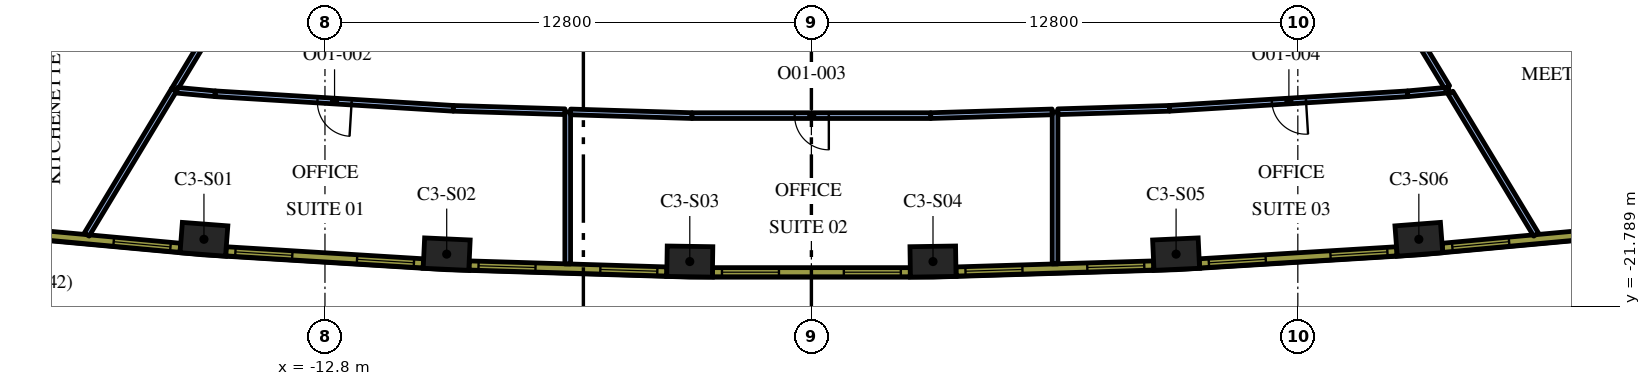
"""IFC4 building model, lengths in metres.
Left out: names, types, materials, properties, quantities, classifications, styles, units other than length and angle.
Written with IfcOpenShell. Run it as: python <this file> out.ifc"""

import sys

from ifc_helpers import new_model, si_unit, direction, frame, frame_2d, origin, origin_2d, place, context, subcontext, project, spatial, rectangle, extrude, element, fill, save


model = new_model("IFC4")
c1 = context("Model", 3, precision=1e-05, world=origin(), true_north=direction((0.0, 1.0)))
c2 = subcontext(c1, "Body", "Model", "MODEL_VIEW")
j1 = project(units=[si_unit("LENGTHUNIT", "METRE"), si_unit("PLANEANGLEUNIT", "RADIAN")], contexts=[c1])
p1 = place(None, origin())
s1 = spatial("IfcSite", under=j1, at=p1, CompositionType="ELEMENT")
p2 = place(p1, origin())
s2 = spatial("IfcBuilding", under=s1, at=p2, CompositionType="ELEMENT")
p3 = place(p2, frame((0.0, 0.0, 150.0)))
s3 = spatial("IfcBuildingStorey", under=s2, at=p3, CompositionType="ELEMENT", Elevation=150.0)
for number, where, z_axis, x_axis in (
    (1, (-15.985, -20.022, 0.0), (0.0, 0.0, 1.0), (0.997, -0.076, 0.0)),
    (2, (-9.597, -20.413, 0.0), (0.0, 0.0, 1.0), (0.999, -0.046, 0.0)),
    (3, (-3.2, -20.608, 0.0), (0.0, 0.0, 1.0), (1.0, -0.015, 0.0)),
    (4, (3.2, -20.608, 0.0), (0.0, 0.0, 1.0), (1.0, 0.015, 0.0)),
    (5, (9.597, -20.413, 0.0), (0.0, 0.0, 1.0), (0.999, 0.046, 0.0)),
    (6, (15.985, -20.022, 0.0), (0.0, 0.0, 1.0), (0.997, 0.076, 0.0)),
):
    element("IfcColumn", number, at=place(p3, frame(where, z_axis=z_axis, x_axis=x_axis)), inside=s3, PredefinedType="COLUMN", context=c2, shape_type="SweptSolid", body=[
        extrude(rectangle(XDim=1.2, YDim=0.8, at=origin_2d()), origin(), (0.0, 0.0, 1.0), 4.2),
    ])
p4 = place(p3, frame((-16.771, -16.09, 0.0), z_axis=(0.0, 0.0, 1.0), x_axis=(-0.516817512045, -0.856095590015, 0.0)))
e7 = element("IfcWall", 7, at=p4, inside=s3, PredefinedType="PARTITIONING", context=c2, shape_type="SweptSolid", body=[
    extrude(rectangle(XDim=4.45, YDim=0.15, at=frame_2d((2.225, 0.0))), origin(), (0.0, 0.0, 1.0), 3.15),
])
p5 = place(p3, frame((-16.775, -16.097, 0.0), z_axis=(0.0, 0.0, 1.0), x_axis=(0.516793803756, 0.856109902057, 0.0)))
e8 = element("IfcWall", 8, at=p5, inside=s3, PredefinedType="PARTITIONING", context=c2, shape_type="SweptSolid", body=[
    extrude(rectangle(XDim=3.856, YDim=0.15, at=frame_2d((1.928, 0.0))), origin(), (0.0, 0.0, 1.0), 3.15),
])
p6 = place(p5, frame((1.456, 0.0, 0.0)))
e9 = element("IfcOpeningElement", 9, at=p6, cuts=e8, PredefinedType="OPENING", context=c2, shape_type="SweptSolid", body=[
    extrude(rectangle(XDim=0.9, YDim=2.1, at=frame_2d((0.45, 1.05))), frame((0.0, 0.085, 0.0), z_axis=(0.0, -1.0, 0.0), x_axis=(1.0, 0.0, 0.0)), (0.0, 0.0, 1.0), 0.17),
])
p7 = place(p3, frame((-6.412, -16.668, 0.0), z_axis=(0.0, 0.0, 1.0), x_axis=(0.0, -1.0, 0.0)))
e10 = element("IfcWall", 10, at=p7, inside=s3, PredefinedType="PARTITIONING", context=c2, shape_type="SweptSolid", body=[
    extrude(rectangle(XDim=4.002, YDim=0.15, at=frame_2d((2.001, 0.0))), origin(), (0.0, 0.0, 1.0), 3.15),
])
p8 = place(p3, frame((-16.69, -16.102, 0.0), z_axis=(0.0, 0.0, 1.0), x_axis=(0.995818997537, -0.091348366946, 0.0)))
e11 = element("IfcWall", 11, at=p8, inside=s3, PredefinedType="PARTITIONING", context=c2, shape_type="SweptSolid", body=[
    extrude(rectangle(XDim=1.002, YDim=0.15, at=frame_2d((0.501, 0.0))), origin(), (0.0, 0.0, 1.0), 3.15),
])
p9 = place(p3, frame((-9.421, -16.576, 0.0), z_axis=(0.0, 0.0, 1.0), x_axis=(-0.998137075468, 0.061011298754, 0.0)))
e12 = element("IfcWall", 12, at=p9, inside=s3, PredefinedType="PARTITIONING", context=c2, shape_type="SweptSolid", body=[
    extrude(rectangle(XDim=6.282, YDim=0.15, at=frame_2d((3.141, 0.0))), origin(), (0.0, 0.0, 1.0), 3.15),
])
p10 = place(p9, frame((2.683, 0.0, 0.0)))
e13 = element("IfcOpeningElement", 13, at=p10, cuts=e12, PredefinedType="OPENING", context=c2, shape_type="SweptSolid", body=[
    extrude(rectangle(XDim=0.9, YDim=2.1, at=frame_2d((0.45, 1.05))), frame((0.0, 0.085, 0.0), z_axis=(0.0, -1.0, 0.0), x_axis=(1.0, 0.0, 0.0)), (0.0, 0.0, 1.0), 0.17),
])
p11 = place(p3, frame((-9.421, -16.576, 0.0), z_axis=(0.0, 0.0, 1.0), x_axis=(0.999533978083, -0.030525835896, 0.0)))
e14 = element("IfcWall", 14, at=p11, inside=s3, PredefinedType="PARTITIONING", context=c2, shape_type="SweptSolid", body=[
    extrude(rectangle(XDim=2.935, YDim=0.15, at=frame_2d((1.468, 0.0))), origin(), (0.0, 0.0, 1.0), 3.15),
])
p12 = place(p3, frame((6.412, -16.668, 0.0), z_axis=(0.0, 0.0, 1.0), x_axis=(0.0, -1.0, 0.0)))
e15 = element("IfcWall", 15, at=p12, inside=s3, PredefinedType="PARTITIONING", context=c2, shape_type="SweptSolid", body=[
    extrude(rectangle(XDim=4.002, YDim=0.15, at=frame_2d((2.001, 0.0))), origin(), (0.0, 0.0, 1.0), 3.15),
])
p13 = place(p3, frame((-6.337, -16.671, 0.0), z_axis=(0.0, 0.0, 1.0), x_axis=(0.999533369646, -0.030545751995, 0.0)))
e16 = element("IfcWall", 16, at=p13, inside=s3, PredefinedType="PARTITIONING", context=c2, shape_type="SweptSolid", body=[
    extrude(rectangle(XDim=3.197, YDim=0.15, at=frame_2d((1.599, 0.0))), origin(), (0.0, 0.0, 1.0), 3.15),
])
p14 = place(p3, frame((3.141, -16.768, 0.0), z_axis=(0.0, 0.0, 1.0), x_axis=(-1.0, 0.0, 0.0)))
e17 = element("IfcWall", 17, at=p14, inside=s3, PredefinedType="PARTITIONING", context=c2, shape_type="SweptSolid", body=[
    extrude(rectangle(XDim=6.283, YDim=0.15, at=frame_2d((3.141, 0.0))), origin(), (0.0, 0.0, 1.0), 3.15),
])
p15 = place(p14, frame((2.683, 0.0, 0.0)))
e18 = element("IfcOpeningElement", 18, at=p15, cuts=e17, PredefinedType="OPENING", context=c2, shape_type="SweptSolid", body=[
    extrude(rectangle(XDim=0.9, YDim=2.1, at=frame_2d((0.45, 1.05))), frame((0.0, 0.085, 0.0), z_axis=(0.0, -1.0, 0.0), x_axis=(1.0, 0.0, 0.0)), (0.0, 0.0, 1.0), 0.17),
])
p16 = place(p3, frame((3.141, -16.768, 0.0), z_axis=(0.0, 0.0, 1.0), x_axis=(0.999533369646, 0.030545751995, 0.0)))
e19 = element("IfcWall", 19, at=p16, inside=s3, PredefinedType="PARTITIONING", context=c2, shape_type="SweptSolid", body=[
    extrude(rectangle(XDim=3.197, YDim=0.15, at=frame_2d((1.599, 0.0))), origin(), (0.0, 0.0, 1.0), 3.15),
])
p17 = place(p3, frame((6.487, -16.666, 0.0), z_axis=(0.0, 0.0, 1.0), x_axis=(0.999533978083, 0.030525835896, 0.0)))
e20 = element("IfcWall", 20, at=p17, inside=s3, PredefinedType="PARTITIONING", context=c2, shape_type="SweptSolid", body=[
    extrude(rectangle(XDim=2.935, YDim=0.15, at=frame_2d((1.468, 0.0))), origin(), (0.0, 0.0, 1.0), 3.15),
])
p18 = place(p3, frame((15.692, -16.193, 0.0), z_axis=(0.0, 0.0, 1.0), x_axis=(-0.998137075468, -0.061011298754, 0.0)))
e21 = element("IfcWall", 21, at=p18, inside=s3, PredefinedType="PARTITIONING", context=c2, shape_type="SweptSolid", body=[
    extrude(rectangle(XDim=6.282, YDim=0.15, at=frame_2d((3.141, 0.0))), origin(), (0.0, 0.0, 1.0), 3.15),
])
p19 = place(p18, frame((2.683, 0.0, 0.0)))
e22 = element("IfcOpeningElement", 22, at=p19, cuts=e21, PredefinedType="OPENING", context=c2, shape_type="SweptSolid", body=[
    extrude(rectangle(XDim=0.9, YDim=2.1, at=frame_2d((0.45, 1.05))), frame((0.0, 0.085, 0.0), z_axis=(0.0, -1.0, 0.0), x_axis=(1.0, 0.0, 0.0)), (0.0, 0.0, 1.0), 0.17),
])
p20 = place(p3, frame((15.692, -16.193, 0.0), z_axis=(0.0, 0.0, 1.0), x_axis=(0.995822859979, 0.091306251389, 0.0)))
e23 = element("IfcWall", 23, at=p20, inside=s3, PredefinedType="PARTITIONING", context=c2, shape_type="SweptSolid", body=[
    extrude(rectangle(XDim=1.086, YDim=0.15, at=frame_2d((0.543, 0.0))), origin(), (0.0, 0.0, 1.0), 3.15),
])
p21 = place(p3, frame((16.816, -16.165, 0.0), z_axis=(0.0, 0.0, 1.0), x_axis=(0.516814925326, -0.85609715159, 0.0)))
e24 = element("IfcWall", 24, at=p21, inside=s3, PredefinedType="PARTITIONING", context=c2, shape_type="SweptSolid", body=[
    extrude(rectangle(XDim=4.362, YDim=0.15, at=frame_2d((2.181, 0.0))), origin(), (0.0, 0.0, 1.0), 3.15),
])
p22 = place(p3, frame((14.782, -12.796, 0.0), z_axis=(0.0, 0.0, 1.0), x_axis=(0.516809076879, -0.856100682196, 0.0)))
e25 = element("IfcWall", 25, at=p22, inside=s3, PredefinedType="PARTITIONING", context=c2, shape_type="SweptSolid", body=[
    extrude(rectangle(XDim=3.768, YDim=0.15, at=frame_2d((1.884, 0.0))), origin(), (0.0, 0.0, 1.0), 3.15),
])
p23 = place(p22, frame((1.4, 0.0, 0.0)))
e26 = element("IfcOpeningElement", 26, at=p23, cuts=e25, PredefinedType="OPENING", context=c2, shape_type="SweptSolid", body=[
    extrude(rectangle(XDim=0.9, YDim=2.1, at=frame_2d((0.45, 1.05))), frame((0.0, 0.085, 0.0), z_axis=(0.0, -1.0, 0.0), x_axis=(1.0, 0.0, 0.0)), (0.0, 0.0, 1.0), 0.17),
])
p24 = place(p3, frame((-21.797, -19.77, 0.0), z_axis=(0.0, 0.0, 1.0), x_axis=(0.995808712151, -0.091460422067, 0.0)))
e27 = element("IfcWall", 27, at=p24, inside=s3, PredefinedType="SOLIDWALL", context=c2, shape_type="SweptSolid", body=[
    extrude(rectangle(XDim=5.213, YDim=0.24, at=frame_2d((2.606, 0.0))), origin(), (0.0, 0.0, 1.0), 3.95),
])
p25 = place(p24, frame((0.221, 0.0, 0.9)))
e28 = element("IfcOpeningElement", 28, at=p25, cuts=e27, PredefinedType="OPENING", context=c2, shape_type="SweptSolid", body=[
    extrude(rectangle(XDim=1.5, YDim=2.55, at=frame_2d((0.75, 1.275))), frame((0.0, 0.13, 0.0), z_axis=(0.0, -1.0, 0.0), x_axis=(1.0, 0.0, 0.0)), (0.0, 0.0, 1.0), 0.26),
])
p26 = place(p24, frame((3.452, 0.0, 0.9)))
e29 = element("IfcOpeningElement", 29, at=p26, cuts=e27, PredefinedType="OPENING", context=c2, shape_type="SweptSolid", body=[
    extrude(rectangle(XDim=1.5, YDim=2.55, at=frame_2d((0.75, 1.275))), frame((0.0, 0.13, 0.0), z_axis=(0.0, -1.0, 0.0), x_axis=(1.0, 0.0, 0.0)), (0.0, 0.0, 1.0), 0.26),
])
p27 = place(p3, frame((-15.405, -20.338, 0.0), z_axis=(0.0, 0.0, 1.0), x_axis=(0.998135294646, -0.061040425794, 0.0)))
e30 = element("IfcWall", 30, at=p27, inside=s3, PredefinedType="SOLIDWALL", context=c2, shape_type="SweptSolid", body=[
    extrude(rectangle(XDim=5.204, YDim=0.24, at=frame_2d((2.602, 0.0))), origin(), (0.0, 0.0, 1.0), 3.95),
])
p28 = place(p27, frame((0.248, 0.0, 0.9)))
e31 = element("IfcOpeningElement", 31, at=p28, cuts=e30, PredefinedType="OPENING", context=c2, shape_type="SweptSolid", body=[
    extrude(rectangle(XDim=1.5, YDim=2.55, at=frame_2d((0.75, 1.275))), frame((0.0, 0.13, 0.0), z_axis=(0.0, -1.0, 0.0), x_axis=(1.0, 0.0, 0.0)), (0.0, 0.0, 1.0), 0.26),
])
p29 = place(p27, frame((3.455, 0.0, 0.9)))
e32 = element("IfcOpeningElement", 32, at=p29, cuts=e30, PredefinedType="OPENING", context=c2, shape_type="SweptSolid", body=[
    extrude(rectangle(XDim=1.5, YDim=2.55, at=frame_2d((0.75, 1.275))), frame((0.0, 0.13, 0.0), z_axis=(0.0, -1.0, 0.0), x_axis=(1.0, 0.0, 0.0)), (0.0, 0.0, 1.0), 0.26),
])
p30 = place(p3, frame((-9.007, -20.711, 0.0), z_axis=(0.0, 0.0, 1.0), x_axis=(0.999533441983, -0.030543384845, 0.0)))
e33 = element("IfcWall", 33, at=p30, inside=s3, PredefinedType="SOLIDWALL", context=c2, shape_type="SweptSolid", body=[
    extrude(rectangle(XDim=5.204, YDim=0.24, at=frame_2d((2.602, 0.0))), origin(), (0.0, 0.0, 1.0), 3.95),
])
p31 = place(p30, frame((0.248, 0.0, 0.9)))
e34 = element("IfcOpeningElement", 34, at=p31, cuts=e33, PredefinedType="OPENING", context=c2, shape_type="SweptSolid", body=[
    extrude(rectangle(XDim=1.5, YDim=2.55, at=frame_2d((0.75, 1.275))), frame((0.0, 0.13, 0.0), z_axis=(0.0, -1.0, 0.0), x_axis=(1.0, 0.0, 0.0)), (0.0, 0.0, 1.0), 0.26),
])
p32 = place(p30, frame((3.455, 0.0, 0.9)))
e35 = element("IfcOpeningElement", 35, at=p32, cuts=e33, PredefinedType="OPENING", context=c2, shape_type="SweptSolid", body=[
    extrude(rectangle(XDim=1.5, YDim=2.55, at=frame_2d((0.75, 1.275))), frame((0.0, 0.13, 0.0), z_axis=(0.0, -1.0, 0.0), x_axis=(1.0, 0.0, 0.0)), (0.0, 0.0, 1.0), 0.26),
])
p33 = place(p3, frame((-2.602, -20.888, 0.0), z_axis=(0.0, 0.0, 1.0), x_axis=(1.0, 0.0, 0.0)))
e36 = element("IfcWall", 36, at=p33, inside=s3, PredefinedType="SOLIDWALL", context=c2, shape_type="SweptSolid", body=[
    extrude(rectangle(XDim=5.204, YDim=0.24, at=frame_2d((2.602, 0.0))), origin(), (0.0, 0.0, 1.0), 3.95),
])
p34 = place(p33, frame((0.248, 0.0, 0.9)))
e37 = element("IfcOpeningElement", 37, at=p34, cuts=e36, PredefinedType="OPENING", context=c2, shape_type="SweptSolid", body=[
    extrude(rectangle(XDim=1.5, YDim=2.55, at=frame_2d((0.75, 1.275))), frame((0.0, 0.13, 0.0), z_axis=(0.0, -1.0, 0.0), x_axis=(1.0, 0.0, 0.0)), (0.0, 0.0, 1.0), 0.26),
])
p35 = place(p33, frame((3.455, 0.0, 0.9)))
e38 = element("IfcOpeningElement", 38, at=p35, cuts=e36, PredefinedType="OPENING", context=c2, shape_type="SweptSolid", body=[
    extrude(rectangle(XDim=1.5, YDim=2.55, at=frame_2d((0.75, 1.275))), frame((0.0, 0.13, 0.0), z_axis=(0.0, -1.0, 0.0), x_axis=(1.0, 0.0, 0.0)), (0.0, 0.0, 1.0), 0.26),
])
p36 = place(p3, frame((3.806, -20.87, 0.0), z_axis=(0.0, 0.0, 1.0), x_axis=(0.999533441983, 0.030543384845, 0.0)))
e39 = element("IfcWall", 39, at=p36, inside=s3, PredefinedType="SOLIDWALL", context=c2, shape_type="SweptSolid", body=[
    extrude(rectangle(XDim=5.204, YDim=0.24, at=frame_2d((2.602, 0.0))), origin(), (0.0, 0.0, 1.0), 3.95),
])
p37 = place(p36, frame((0.248, 0.0, 0.9)))
e40 = element("IfcOpeningElement", 40, at=p37, cuts=e39, PredefinedType="OPENING", context=c2, shape_type="SweptSolid", body=[
    extrude(rectangle(XDim=1.5, YDim=2.55, at=frame_2d((0.75, 1.275))), frame((0.0, 0.13, 0.0), z_axis=(0.0, -1.0, 0.0), x_axis=(1.0, 0.0, 0.0)), (0.0, 0.0, 1.0), 0.26),
])
p38 = place(p36, frame((3.455, 0.0, 0.9)))
e41 = element("IfcOpeningElement", 41, at=p38, cuts=e39, PredefinedType="OPENING", context=c2, shape_type="SweptSolid", body=[
    extrude(rectangle(XDim=1.5, YDim=2.55, at=frame_2d((0.75, 1.275))), frame((0.0, 0.13, 0.0), z_axis=(0.0, -1.0, 0.0), x_axis=(1.0, 0.0, 0.0)), (0.0, 0.0, 1.0), 0.26),
])
p39 = place(p3, frame((10.211, -20.656, 0.0), z_axis=(0.0, 0.0, 1.0), x_axis=(0.998135294646, 0.061040425794, 0.0)))
e42 = element("IfcWall", 42, at=p39, inside=s3, PredefinedType="SOLIDWALL", context=c2, shape_type="SweptSolid", body=[
    extrude(rectangle(XDim=5.204, YDim=0.24, at=frame_2d((2.602, 0.0))), origin(), (0.0, 0.0, 1.0), 3.95),
])
p40 = place(p39, frame((0.248, 0.0, 0.9)))
e43 = element("IfcOpeningElement", 43, at=p40, cuts=e42, PredefinedType="OPENING", context=c2, shape_type="SweptSolid", body=[
    extrude(rectangle(XDim=1.5, YDim=2.55, at=frame_2d((0.75, 1.275))), frame((0.0, 0.13, 0.0), z_axis=(0.0, -1.0, 0.0), x_axis=(1.0, 0.0, 0.0)), (0.0, 0.0, 1.0), 0.26),
])
p41 = place(p39, frame((3.455, 0.0, 0.9)))
e44 = element("IfcOpeningElement", 44, at=p41, cuts=e42, PredefinedType="OPENING", context=c2, shape_type="SweptSolid", body=[
    extrude(rectangle(XDim=1.5, YDim=2.55, at=frame_2d((0.75, 1.275))), frame((0.0, 0.13, 0.0), z_axis=(0.0, -1.0, 0.0), x_axis=(1.0, 0.0, 0.0)), (0.0, 0.0, 1.0), 0.26),
])
p42 = place(p3, frame((16.606, -20.247, 0.0), z_axis=(0.0, 0.0, 1.0), x_axis=(0.995808712151, 0.091460422067, 0.0)))
e45 = element("IfcWall", 45, at=p42, inside=s3, PredefinedType="SOLIDWALL", context=c2, shape_type="SweptSolid", body=[
    extrude(rectangle(XDim=5.213, YDim=0.24, at=frame_2d((2.606, 0.0))), origin(), (0.0, 0.0, 1.0), 3.95),
])
p43 = place(p42, frame((0.261, 0.0, 0.9)))
e46 = element("IfcOpeningElement", 46, at=p43, cuts=e45, PredefinedType="OPENING", context=c2, shape_type="SweptSolid", body=[
    extrude(rectangle(XDim=1.5, YDim=2.55, at=frame_2d((0.75, 1.275))), frame((0.0, 0.13, 0.0), z_axis=(0.0, -1.0, 0.0), x_axis=(1.0, 0.0, 0.0)), (0.0, 0.0, 1.0), 0.26),
])
p44 = place(p42, frame((3.492, 0.0, 0.9)))
e47 = element("IfcOpeningElement", 47, at=p44, cuts=e45, PredefinedType="OPENING", context=c2, shape_type="SweptSolid", body=[
    extrude(rectangle(XDim=1.5, YDim=2.55, at=frame_2d((0.75, 1.275))), frame((0.0, 0.13, 0.0), z_axis=(0.0, -1.0, 0.0), x_axis=(1.0, 0.0, 0.0)), (0.0, 0.0, 1.0), 0.26),
])
p45 = place(p10, origin())
e48 = element("IfcDoor", 48, at=p45, inside=s3, OperationType="SINGLE_SWING_LEFT", PredefinedType="DOOR", context=c2, shape_type="SweptSolid", body=[
    extrude(rectangle(XDim=0.9, YDim=2.1, at=frame_2d((0.45, 1.05))), frame((0.0, 0.025, 0.0), z_axis=(0.0, -1.0, 0.0), x_axis=(1.0, 0.0, 0.0)), (0.0, 0.0, 1.0), 0.05),
])
fill(e13, e48)
p46 = place(p15, origin())
e49 = element("IfcDoor", 49, at=p46, inside=s3, OperationType="SINGLE_SWING_LEFT", PredefinedType="DOOR", context=c2, shape_type="SweptSolid", body=[
    extrude(rectangle(XDim=0.9, YDim=2.1, at=frame_2d((0.45, 1.05))), frame((0.0, 0.025, 0.0), z_axis=(0.0, -1.0, 0.0), x_axis=(1.0, 0.0, 0.0)), (0.0, 0.0, 1.0), 0.05),
])
fill(e18, e49)
p47 = place(p19, origin())
e50 = element("IfcDoor", 50, at=p47, inside=s3, OperationType="SINGLE_SWING_LEFT", PredefinedType="DOOR", context=c2, shape_type="SweptSolid", body=[
    extrude(rectangle(XDim=0.9, YDim=2.1, at=frame_2d((0.45, 1.05))), frame((0.0, 0.025, 0.0), z_axis=(0.0, -1.0, 0.0), x_axis=(1.0, 0.0, 0.0)), (0.0, 0.0, 1.0), 0.05),
])
fill(e22, e50)
p48 = place(p26, origin())
e51 = element("IfcWindow", 51, at=p48, inside=s3, PartitioningType="SINGLE_PANEL", PredefinedType="WINDOW", context=c2, shape_type="SweptSolid", body=[
    extrude(rectangle(XDim=1.5, YDim=2.55, at=frame_2d((0.75, 1.275))), frame((0.0, 0.04, 0.0), z_axis=(0.0, -1.0, 0.0), x_axis=(1.0, 0.0, 0.0)), (0.0, 0.0, 1.0), 0.06),
])
fill(e29, e51)
p49 = place(p28, origin())
e52 = element("IfcWindow", 52, at=p49, inside=s3, PartitioningType="SINGLE_PANEL", PredefinedType="WINDOW", context=c2, shape_type="SweptSolid", body=[
    extrude(rectangle(XDim=1.5, YDim=2.55, at=frame_2d((0.75, 1.275))), frame((0.0, 0.04, 0.0), z_axis=(0.0, -1.0, 0.0), x_axis=(1.0, 0.0, 0.0)), (0.0, 0.0, 1.0), 0.06),
])
fill(e31, e52)
p50 = place(p29, origin())
e53 = element("IfcWindow", 53, at=p50, inside=s3, PartitioningType="SINGLE_PANEL", PredefinedType="WINDOW", context=c2, shape_type="SweptSolid", body=[
    extrude(rectangle(XDim=1.5, YDim=2.55, at=frame_2d((0.75, 1.275))), frame((0.0, 0.04, 0.0), z_axis=(0.0, -1.0, 0.0), x_axis=(1.0, 0.0, 0.0)), (0.0, 0.0, 1.0), 0.06),
])
fill(e32, e53)
p51 = place(p31, origin())
e54 = element("IfcWindow", 54, at=p51, inside=s3, PartitioningType="SINGLE_PANEL", PredefinedType="WINDOW", context=c2, shape_type="SweptSolid", body=[
    extrude(rectangle(XDim=1.5, YDim=2.55, at=frame_2d((0.75, 1.275))), frame((0.0, 0.04, 0.0), z_axis=(0.0, -1.0, 0.0), x_axis=(1.0, 0.0, 0.0)), (0.0, 0.0, 1.0), 0.06),
])
fill(e34, e54)
p52 = place(p32, origin())
e55 = element("IfcWindow", 55, at=p52, inside=s3, PartitioningType="SINGLE_PANEL", PredefinedType="WINDOW", context=c2, shape_type="SweptSolid", body=[
    extrude(rectangle(XDim=1.5, YDim=2.55, at=frame_2d((0.75, 1.275))), frame((0.0, 0.04, 0.0), z_axis=(0.0, -1.0, 0.0), x_axis=(1.0, 0.0, 0.0)), (0.0, 0.0, 1.0), 0.06),
])
fill(e35, e55)
p53 = place(p34, origin())
e56 = element("IfcWindow", 56, at=p53, inside=s3, PartitioningType="SINGLE_PANEL", PredefinedType="WINDOW", context=c2, shape_type="SweptSolid", body=[
    extrude(rectangle(XDim=1.5, YDim=2.55, at=frame_2d((0.75, 1.275))), frame((0.0, 0.04, 0.0), z_axis=(0.0, -1.0, 0.0), x_axis=(1.0, 0.0, 0.0)), (0.0, 0.0, 1.0), 0.06),
])
fill(e37, e56)
p54 = place(p35, origin())
e57 = element("IfcWindow", 57, at=p54, inside=s3, PartitioningType="SINGLE_PANEL", PredefinedType="WINDOW", context=c2, shape_type="SweptSolid", body=[
    extrude(rectangle(XDim=1.5, YDim=2.55, at=frame_2d((0.75, 1.275))), frame((0.0, 0.04, 0.0), z_axis=(0.0, -1.0, 0.0), x_axis=(1.0, 0.0, 0.0)), (0.0, 0.0, 1.0), 0.06),
])
fill(e38, e57)
p55 = place(p37, origin())
e58 = element("IfcWindow", 58, at=p55, inside=s3, PartitioningType="SINGLE_PANEL", PredefinedType="WINDOW", context=c2, shape_type="SweptSolid", body=[
    extrude(rectangle(XDim=1.5, YDim=2.55, at=frame_2d((0.75, 1.275))), frame((0.0, 0.04, 0.0), z_axis=(0.0, -1.0, 0.0), x_axis=(1.0, 0.0, 0.0)), (0.0, 0.0, 1.0), 0.06),
])
fill(e40, e58)
p56 = place(p38, origin())
e59 = element("IfcWindow", 59, at=p56, inside=s3, PartitioningType="SINGLE_PANEL", PredefinedType="WINDOW", context=c2, shape_type="SweptSolid", body=[
    extrude(rectangle(XDim=1.5, YDim=2.55, at=frame_2d((0.75, 1.275))), frame((0.0, 0.04, 0.0), z_axis=(0.0, -1.0, 0.0), x_axis=(1.0, 0.0, 0.0)), (0.0, 0.0, 1.0), 0.06),
])
fill(e41, e59)
p57 = place(p40, origin())
e60 = element("IfcWindow", 60, at=p57, inside=s3, PartitioningType="SINGLE_PANEL", PredefinedType="WINDOW", context=c2, shape_type="SweptSolid", body=[
    extrude(rectangle(XDim=1.5, YDim=2.55, at=frame_2d((0.75, 1.275))), frame((0.0, 0.04, 0.0), z_axis=(0.0, -1.0, 0.0), x_axis=(1.0, 0.0, 0.0)), (0.0, 0.0, 1.0), 0.06),
])
fill(e43, e60)
p58 = place(p41, origin())
e61 = element("IfcWindow", 61, at=p58, inside=s3, PartitioningType="SINGLE_PANEL", PredefinedType="WINDOW", context=c2, shape_type="SweptSolid", body=[
    extrude(rectangle(XDim=1.5, YDim=2.55, at=frame_2d((0.75, 1.275))), frame((0.0, 0.04, 0.0), z_axis=(0.0, -1.0, 0.0), x_axis=(1.0, 0.0, 0.0)), (0.0, 0.0, 1.0), 0.06),
])
fill(e44, e61)
p59 = place(p43, origin())
e62 = element("IfcWindow", 62, at=p59, inside=s3, PartitioningType="SINGLE_PANEL", PredefinedType="WINDOW", context=c2, shape_type="SweptSolid", body=[
    extrude(rectangle(XDim=1.5, YDim=2.55, at=frame_2d((0.75, 1.275))), frame((0.0, 0.04, 0.0), z_axis=(0.0, -1.0, 0.0), x_axis=(1.0, 0.0, 0.0)), (0.0, 0.0, 1.0), 0.06),
])
fill(e46, e62)
save(model, sys.argv[1])
